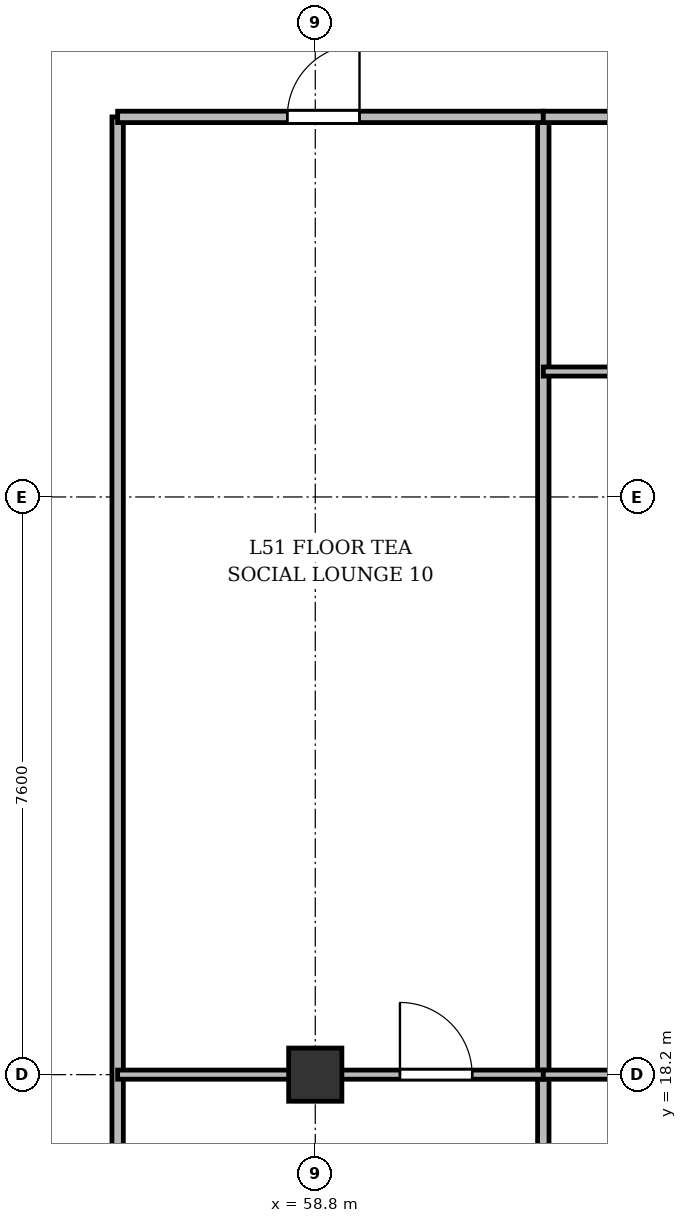
"""IFC4 building model, lengths in metres.
Left out: names, types, materials, properties, quantities, classifications, styles, units other than length and angle.
Written with IfcOpenShell. Run it as: python <this file> out.ifc"""

import sys

from ifc_helpers import new_model, si_unit, direction, frame, frame_2d, origin, origin_2d, place, context, subcontext, project, spatial, rectangle, extrude, source, transform, mapped, element, fill, save


model = new_model("IFC4")
c1 = context("Model", 3, precision=1e-05, world=origin(), true_north=direction((0.0, 1.0)))
c2 = subcontext(c1, "Body", "Model", "MODEL_VIEW")
j1 = project(units=[si_unit("LENGTHUNIT", "METRE"), si_unit("PLANEANGLEUNIT", "RADIAN")], contexts=[c1])
p1 = place(None, origin())
s1 = spatial("IfcSite", under=j1, at=p1, CompositionType="ELEMENT")
p2 = place(p1, origin())
s2 = spatial("IfcBuilding", under=s1, at=p2, CompositionType="ELEMENT")
p3 = place(p2, frame((0.0, 0.0, 197.7)))
s3 = spatial("IfcBuildingStorey", under=s2, at=p3, CompositionType="ELEMENT", Elevation=197.7)
m1 = source(origin(), c2, "Body", "SweptSolid", [
    extrude(rectangle(XDim=0.7, YDim=0.7, at=origin_2d()), origin(), (0.0, 0.0, 1.0), 3.6),
])
p4 = place(p3, frame((58.8, 18.2, 0.0), z_axis=(0.0, 0.0, 1.0), x_axis=(1.0, 0.0, 0.0)))
e1 = element("IfcColumn", 1, at=p4, inside=s3, PredefinedType="COLUMN", context=c2, shape_type="MappedRepresentation", body=[
    mapped(m1, transform((0.0, 0.0, 0.0), x_axis=(1.0, 0.0, 0.0), y_axis=(0.0, 1.0, 0.0), z_axis=(0.0, 0.0, 1.0), scale=1.0)),
])
for number, where, z_axis, x_axis in (
    (2, (61.8, 3.625, 0.0), (0.0, 0.0, 1.0), (0.0, 1.0, 0.0)),
    (3, (56.2, 3.625, 0.0), (0.0, 0.0, 1.0), (0.0, 1.0, 0.0)),
):
    element("IfcWall", number, at=place(p3, frame(where, z_axis=z_axis, x_axis=x_axis)), inside=s3, PredefinedType="PARTITIONING", context=c2, shape_type="SweptSolid", body=[
        extrude(rectangle(XDim=27.175, YDim=0.15, at=frame_2d((13.587, 0.0))), origin(), (0.0, 0.0, 1.0), 2.91),
    ])
p5 = place(p3, frame((56.2, 30.8, 0.0), z_axis=(0.0, 0.0, 1.0), x_axis=(1.0, 0.0, 0.0)))
e4 = element("IfcWall", 4, at=p5, inside=s3, PredefinedType="PARTITIONING", context=c2, shape_type="SweptSolid", body=[
    extrude(rectangle(XDim=5.6, YDim=0.15, at=frame_2d((2.8, 0.0))), origin(), (0.0, 0.0, 1.0), 2.86),
])
p6 = place(p5, frame((2.232, 0.0, 0.0)))
e5 = element("IfcOpeningElement", 5, at=p6, cuts=e4, PredefinedType="OPENING", context=c2, shape_type="SweptSolid", body=[
    extrude(rectangle(XDim=0.95, YDim=2.15, at=frame_2d((0.475, 1.075))), frame((0.0, 0.085, 0.0), z_axis=(0.0, -1.0, 0.0), x_axis=(1.0, 0.0, 0.0)), (0.0, 0.0, 1.0), 0.17),
])
p7 = place(p3, frame((56.2, 18.2, 0.0), z_axis=(0.0, 0.0, 1.0), x_axis=(1.0, 0.0, 0.0)))
e6 = element("IfcWall", 6, at=p7, inside=s3, PredefinedType="PARTITIONING", context=c2, shape_type="SweptSolid", body=[
    extrude(rectangle(XDim=5.6, YDim=0.12, at=frame_2d((2.8, 0.0))), origin(), (0.0, 0.0, 1.0), 2.91),
])
p8 = place(p7, frame((3.714, 0.0, 0.0)))
e7 = element("IfcOpeningElement", 7, at=p8, cuts=e6, PredefinedType="OPENING", context=c2, shape_type="SweptSolid", body=[
    extrude(rectangle(XDim=0.95, YDim=2.15, at=frame_2d((0.475, 1.075))), frame((0.0, 0.07, 0.0), z_axis=(0.0, -1.0, 0.0), x_axis=(1.0, 0.0, 0.0)), (0.0, 0.0, 1.0), 0.14),
])
p9 = place(p3, frame((61.8, 18.2, 0.0), z_axis=(0.0, 0.0, 1.0), x_axis=(1.0, 0.0, 0.0)))
e8 = element("IfcWall", 8, at=p9, inside=s3, PredefinedType="PARTITIONING", context=c2, shape_type="SweptSolid", body=[
    extrude(rectangle(XDim=4.36, YDim=0.12, at=frame_2d((2.18, 0.0))), origin(), (0.0, 0.0, 1.0), 2.91),
])
p10 = place(p9, frame((1.705, 0.0, 0.0)))
e9 = element("IfcOpeningElement", 9, at=p10, cuts=e8, PredefinedType="OPENING", context=c2, shape_type="SweptSolid", body=[
    extrude(rectangle(XDim=0.95, YDim=2.15, at=frame_2d((0.475, 1.075))), frame((0.0, 0.07, 0.0), z_axis=(0.0, -1.0, 0.0), x_axis=(1.0, 0.0, 0.0)), (0.0, 0.0, 1.0), 0.14),
])
p11 = place(p3, frame((61.8, 27.45, 0.0), z_axis=(0.0, 0.0, 1.0), x_axis=(1.0, 0.0, 0.0)))
e10 = element("IfcWall", 10, at=p11, inside=s3, PredefinedType="PARTITIONING", context=c2, shape_type="SweptSolid", body=[
    extrude(rectangle(XDim=1.9, YDim=0.12, at=frame_2d((0.95, 0.0))), origin(), (0.0, 0.0, 1.0), 3.36),
])
p12 = place(p3, frame((61.8, 30.8, 0.0), z_axis=(0.0, 0.0, 1.0), x_axis=(1.0, 0.0, 0.0)))
e11 = element("IfcWall", 11, at=p12, inside=s3, PredefinedType="PARTITIONING", context=c2, shape_type="SweptSolid", body=[
    extrude(rectangle(XDim=4.375, YDim=0.15, at=frame_2d((2.188, 0.0))), origin(), (0.0, 0.0, 1.0), 2.86),
])
p13 = place(p12, frame((2.744, 0.0, 0.0)))
e12 = element("IfcOpeningElement", 12, at=p13, cuts=e11, PredefinedType="OPENING", context=c2, shape_type="SweptSolid", body=[
    extrude(rectangle(XDim=0.95, YDim=2.15, at=frame_2d((0.475, 1.075))), frame((0.0, 0.085, 0.0), z_axis=(0.0, -1.0, 0.0), x_axis=(1.0, 0.0, 0.0)), (0.0, 0.0, 1.0), 0.17),
])
m2 = source(origin(), c2, "Body", "SweptSolid", [
    extrude(rectangle(XDim=0.95, YDim=2.15, at=frame_2d((0.475, 1.075))), frame((0.0, 0.025, 0.0), z_axis=(0.0, -1.0, 0.0), x_axis=(1.0, 0.0, 0.0)), (0.0, 0.0, 1.0), 0.05),
])
p14 = place(p6, origin())
e13 = element("IfcDoor", 13, at=p14, inside=s3, OperationType="SINGLE_SWING_RIGHT", PredefinedType="DOOR", context=c2, shape_type="MappedRepresentation", body=[
    mapped(m2, transform((0.0, 0.0, 0.0), x_axis=(1.0, 0.0, 0.0), y_axis=(0.0, 1.0, 0.0), z_axis=(0.0, 0.0, 1.0), scale=1.0)),
])
fill(e5, e13)
p15 = place(p8, origin())
e14 = element("IfcDoor", 14, at=p15, inside=s3, OperationType="SINGLE_SWING_LEFT", PredefinedType="DOOR", context=c2, shape_type="MappedRepresentation", body=[
    mapped(m2, transform((0.0, 0.0, 0.0), x_axis=(1.0, 0.0, 0.0), y_axis=(0.0, 1.0, 0.0), z_axis=(0.0, 0.0, 1.0), scale=1.0)),
])
fill(e7, e14)
save(model, sys.argv[1])
